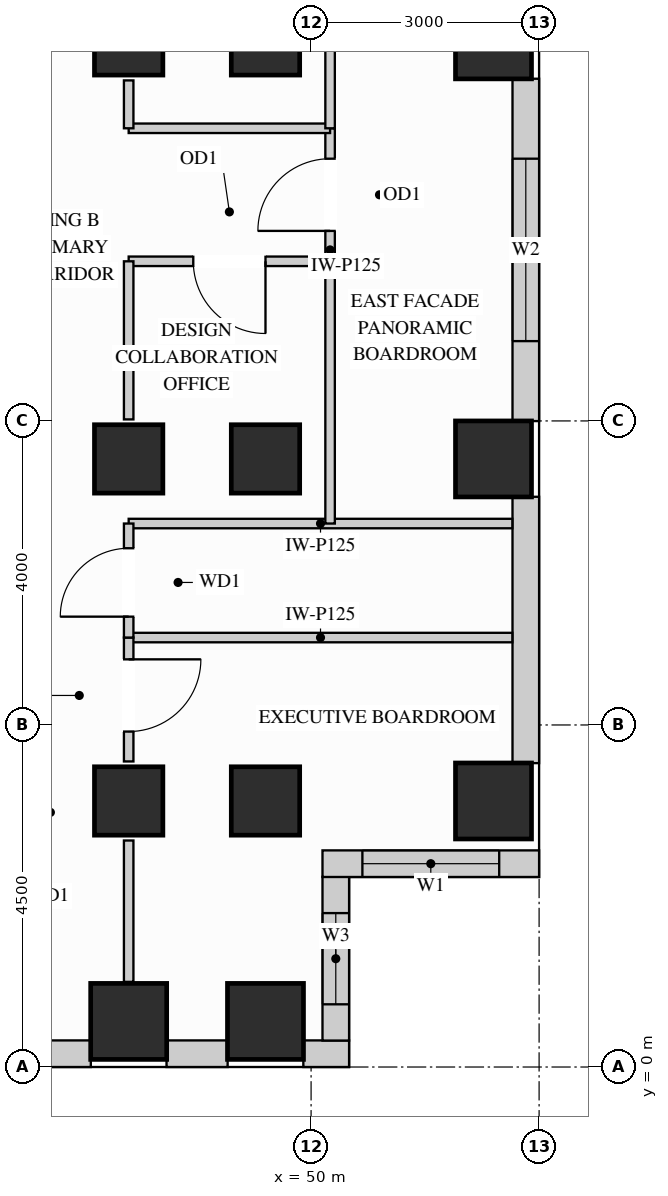
"""IFC4 building model, lengths in metres.
Left out: names, types, materials, properties, quantities, classifications, styles, units other than length and angle.
Written with IfcOpenShell. Run it as: python <this file> out.ifc"""

import sys

from ifc_helpers import new_model, si_unit, direction, frame, frame_2d, origin, origin_2d, place, context, subcontext, project, spatial, rectangle, extrude, source, transform, mapped, element, fill, save


model = new_model("IFC4")
c1 = context("Model", 3, precision=1e-05, world=origin(), true_north=direction((0.0, 1.0)))
c2 = subcontext(c1, "Body", "Model", "MODEL_VIEW")
j1 = project(units=[si_unit("LENGTHUNIT", "METRE"), si_unit("PLANEANGLEUNIT", "RADIAN")], contexts=[c1])
p1 = place(None, origin())
s1 = spatial("IfcSite", under=j1, at=p1, CompositionType="ELEMENT")
p2 = place(p1, origin())
s2 = spatial("IfcBuilding", under=s1, at=p2, CompositionType="ELEMENT")
p3 = place(p2, frame((0.0, 0.0, 197.1)))
s3 = spatial("IfcBuildingStorey", under=s2, at=p3, CompositionType="ELEMENT", Elevation=197.1)
m1 = source(origin(), c2, "Body", "SweptSolid", [
    extrude(rectangle(XDim=0.9, YDim=0.9, at=origin_2d()), origin(), (0.0, 0.0, 1.0), 3.4),
])
for number, where, z_axis, x_axis in (
    (1, (47.6, 13.5, 0.0), (0.0, 0.0, 1.0), (1.0, 0.0, 0.0)),
    (2, (47.6, 3.5, 0.0), (0.0, 0.0, 1.0), (1.0, 0.0, 0.0)),
    (3, (47.6, 8.0, 0.0), (0.0, 0.0, 1.0), (1.0, 0.0, 0.0)),
    (4, (49.4, 13.5, 0.0), (0.0, 0.0, 1.0), (1.0, 0.0, 0.0)),
    (5, (49.4, 3.5, 0.0), (0.0, 0.0, 1.0), (1.0, 0.0, 0.0)),
    (6, (49.4, 8.0, 0.0), (0.0, 0.0, 1.0), (1.0, 0.0, 0.0)),
):
    element("IfcColumn", number, at=place(p3, frame(where, z_axis=z_axis, x_axis=x_axis)), inside=s3, PredefinedType="COLUMN", context=c2, shape_type="MappedRepresentation", body=[
        mapped(m1, transform((0.0, 0.0, 0.0), x_axis=(1.0, 0.0, 0.0), y_axis=(0.0, 1.0, 0.0), z_axis=(0.0, 0.0, 1.0))),
    ])
m2 = source(origin(), c2, "Body", "SweptSolid", [
    extrude(rectangle(XDim=1.0, YDim=1.0, at=origin_2d()), origin(), (0.0, 0.0, 1.0), 3.4),
])
for number, where, z_axis, x_axis in (
    (7, (52.4, 13.5, 0.0), (0.0, 0.0, 1.0), (1.0, 0.0, 0.0)),
    (8, (52.4, 3.5, 0.0), (0.0, 0.0, 1.0), (1.0, 0.0, 0.0)),
    (9, (52.4, 8.0, 0.0), (0.0, 0.0, 1.0), (1.0, 0.0, 0.0)),
    (10, (47.6, 0.6, 0.0), (0.0, 0.0, 1.0), (1.0, 0.0, 0.0)),
    (11, (49.4, 0.6, 0.0), (0.0, 0.0, 1.0), (1.0, 0.0, 0.0)),
):
    element("IfcColumn", number, at=place(p3, frame(where, z_axis=z_axis, x_axis=x_axis)), inside=s3, PredefinedType="COLUMN", context=c2, shape_type="MappedRepresentation", body=[
        mapped(m2, transform((0.0, 0.0, 0.0), x_axis=(1.0, 0.0, 0.0), y_axis=(0.0, 1.0, 0.0), z_axis=(0.0, 0.0, 1.0))),
    ])
p4 = place(p3, frame((40.498, 0.175, 0.0), z_axis=(0.0, 0.0, 1.0), x_axis=(1.0, 0.0, 0.0)))
e12 = element("IfcWall", 12, at=p4, inside=s3, PredefinedType="SOLIDWALL", context=c2, shape_type="SweptSolid", body=[
    extrude(rectangle(XDim=6.604, YDim=0.35, at=frame_2d((3.302, 0.0))), origin(), (0.0, 0.0, 1.0), 2.612),
])
p5 = place(p4, frame((0.737, 0.0, 0.78)))
e13 = element("IfcOpeningElement", 13, at=p5, cuts=e12, PredefinedType="OPENING", context=c2, shape_type="SweptSolid", body=[
    extrude(rectangle(XDim=1.8, YDim=1.652, at=frame_2d((0.9, 0.826))), frame((0.0, 0.185, 0.0), z_axis=(0.0, -1.0, 0.0), x_axis=(1.0, 0.0, 0.0)), (0.0, 0.0, 1.0), 0.37),
])
p6 = place(p4, frame((2.955, 0.0, 0.78)))
e14 = element("IfcOpeningElement", 14, at=p6, cuts=e12, PredefinedType="OPENING", context=c2, shape_type="SweptSolid", body=[
    extrude(rectangle(XDim=1.8, YDim=1.652, at=frame_2d((0.9, 0.826))), frame((0.0, 0.185, 0.0), z_axis=(0.0, -1.0, 0.0), x_axis=(1.0, 0.0, 0.0)), (0.0, 0.0, 1.0), 0.37),
])
m3 = source(origin(), c2, "Body", "SweptSolid", [
    extrude(rectangle(XDim=0.804, YDim=0.35, at=frame_2d((0.402, 0.0))), origin(), (0.0, 0.0, 1.0), 3.385),
])
p7 = place(p3, frame((48.098, 0.175, 0.0), z_axis=(0.0, 0.0, 1.0), x_axis=(1.0, 0.0, 0.0)))
e15 = element("IfcWall", 15, at=p7, inside=s3, PredefinedType="SOLIDWALL", context=c2, shape_type="MappedRepresentation", body=[
    mapped(m3, transform((0.0, 0.0, 0.0), x_axis=(1.0, 0.0, 0.0), y_axis=(0.0, 1.0, 0.0), z_axis=(0.0, 0.0, 1.0))),
])
m4 = source(origin(), c2, "Body", "SweptSolid", [
    extrude(rectangle(XDim=0.602, YDim=0.35, at=frame_2d((0.301, 0.0))), origin(), (0.0, 0.0, 1.0), 3.385),
])
p8 = place(p3, frame((49.898, 0.175, 0.0), z_axis=(0.0, 0.0, 1.0), x_axis=(1.0, 0.0, 0.0)))
e16 = element("IfcWall", 16, at=p8, inside=s3, PredefinedType="SOLIDWALL", context=c2, shape_type="MappedRepresentation", body=[
    mapped(m4, transform((0.0, 0.0, 0.0), x_axis=(1.0, 0.0, 0.0), y_axis=(0.0, 1.0, 0.0), z_axis=(0.0, 0.0, 1.0))),
])
p9 = place(p3, frame((50.325, 0.348, 0.0), z_axis=(0.0, 0.0, 1.0), x_axis=(0.0, 1.0, 0.0)))
e17 = element("IfcWall", 17, at=p9, inside=s3, PredefinedType="SOLIDWALL", context=c2, shape_type="SweptSolid", body=[
    extrude(rectangle(XDim=2.154, YDim=0.35, at=frame_2d((1.077, 0.0))), origin(), (0.0, 0.0, 1.0), 3.385),
])
p10 = place(p9, frame((0.477, 0.0, 0.78)))
e18 = element("IfcOpeningElement", 18, at=p10, cuts=e17, PredefinedType="OPENING", context=c2, shape_type="SweptSolid", body=[
    extrude(rectangle(XDim=1.2, YDim=2.1, at=frame_2d((0.6, 1.05))), frame((0.0, 0.185, 0.0), z_axis=(0.0, -1.0, 0.0), x_axis=(1.0, 0.0, 0.0)), (0.0, 0.0, 1.0), 0.37),
])
p11 = place(p3, frame((50.15, 2.675, 0.0), z_axis=(0.0, 0.0, 1.0), x_axis=(1.0, 0.0, 0.0)))
e19 = element("IfcWall", 19, at=p11, inside=s3, PredefinedType="SOLIDWALL", context=c2, shape_type="SweptSolid", body=[
    extrude(rectangle(XDim=2.85, YDim=0.35, at=frame_2d((1.425, 0.0))), origin(), (0.0, 0.0, 1.0), 3.385),
])
p12 = place(p11, frame((0.525, 0.0, 0.78)))
e20 = element("IfcOpeningElement", 20, at=p12, cuts=e19, PredefinedType="OPENING", context=c2, shape_type="SweptSolid", body=[
    extrude(rectangle(XDim=1.8, YDim=2.1, at=frame_2d((0.9, 1.05))), frame((0.0, 0.185, 0.0), z_axis=(0.0, -1.0, 0.0), x_axis=(1.0, 0.0, 0.0)), (0.0, 0.0, 1.0), 0.37),
])
m5 = source(origin(), c2, "Body", "SweptSolid", [
    extrude(rectangle(XDim=3.504, YDim=0.35, at=frame_2d((1.752, 0.0))), origin(), (0.0, 0.0, 1.0), 2.612),
])
p13 = place(p3, frame((52.825, 3.998, 0.0), z_axis=(0.0, 0.0, 1.0), x_axis=(0.0, 1.0, 0.0)))
e21 = element("IfcWall", 21, at=p13, inside=s3, PredefinedType="SOLIDWALL", context=c2, shape_type="MappedRepresentation", body=[
    mapped(m5, transform((0.0, 0.0, 0.0), x_axis=(1.0, 0.0, 0.0), y_axis=(0.0, 1.0, 0.0), z_axis=(0.0, 0.0, 1.0))),
])
p14 = place(p3, frame((52.825, 8.498, 0.0), z_axis=(0.0, 0.0, 1.0), x_axis=(0.0, 1.0, 0.0)))
e22 = element("IfcWall", 22, at=p14, inside=s3, PredefinedType="SOLIDWALL", context=c2, shape_type="SweptSolid", body=[
    extrude(rectangle(XDim=4.504, YDim=0.35, at=frame_2d((2.252, 0.0))), origin(), (0.0, 0.0, 1.0), 2.612),
])
p15 = place(p14, frame((1.052, 0.0, 0.78)))
e23 = element("IfcOpeningElement", 23, at=p15, cuts=e22, PredefinedType="OPENING", context=c2, shape_type="SweptSolid", body=[
    extrude(rectangle(XDim=2.4, YDim=1.652, at=frame_2d((1.2, 0.826))), frame((0.0, 0.185, 0.0), z_axis=(0.0, -1.0, 0.0), x_axis=(1.0, 0.0, 0.0)), (0.0, 0.0, 1.0), 0.37),
])
p16 = place(p3, frame((50.25, 10.6, 0.0), z_axis=(0.0, 0.0, 1.0), x_axis=(0.0, 1.0, 0.0)))
e24 = element("IfcWall", 24, at=p16, inside=s3, PredefinedType="PARTITIONING", context=c2, shape_type="SweptSolid", body=[
    extrude(rectangle(XDim=1.75, YDim=0.125, at=frame_2d((0.875, 0.0))), origin(), (0.0, 0.0, 1.0), 3.385),
])
p17 = place(p16, frame((0.4, 0.0, 0.0)))
e25 = element("IfcOpeningElement", 25, at=p17, cuts=e24, PredefinedType="OPENING", context=c2, shape_type="SweptSolid", body=[
    extrude(rectangle(XDim=0.95, YDim=2.15, at=frame_2d((0.475, 1.075))), frame((0.0, 0.073, 0.0), z_axis=(0.0, -1.0, 0.0), x_axis=(1.0, 0.0, 0.0)), (0.0, 0.0, 1.0), 0.145),
])
m6 = source(origin(), c2, "Body", "SweptSolid", [
    extrude(rectangle(XDim=5.048, YDim=0.125, at=frame_2d((2.524, 0.0))), origin(), (0.0, 0.0, 1.0), 3.385),
])
for number, where, z_axis, x_axis in (
    (26, (47.6, 5.65, 0.0), (0.0, 0.0, 1.0), (1.0, 0.0, 0.0)),
    (27, (47.6, 7.15, 0.0), (0.0, 0.0, 1.0), (1.0, 0.0, 0.0)),
):
    element("IfcWall", number, at=place(p3, frame(where, z_axis=z_axis, x_axis=x_axis)), inside=s3, PredefinedType="PARTITIONING", context=c2, shape_type="MappedRepresentation", body=[
        mapped(m6, transform((0.0, 0.0, 0.0), x_axis=(1.0, 0.0, 0.0), y_axis=(0.0, 1.0, 0.0), z_axis=(0.0, 0.0, 1.0))),
    ])
m7 = source(origin(), c2, "Body", "SweptSolid", [
    extrude(rectangle(XDim=2.65, YDim=0.125, at=frame_2d((1.325, 0.0))), origin(), (0.0, 0.0, 1.0), 3.385),
])
p18 = place(p3, frame((47.6, 12.35, 0.0), z_axis=(0.0, 0.0, 1.0), x_axis=(1.0, 0.0, 0.0)))
e28 = element("IfcWall", 28, at=p18, inside=s3, PredefinedType="PARTITIONING", context=c2, shape_type="MappedRepresentation", body=[
    mapped(m7, transform((0.0, 0.0, 0.0), x_axis=(1.0, 0.0, 0.0), y_axis=(0.0, 1.0, 0.0), z_axis=(0.0, 0.0, 1.0))),
])
p19 = place(p3, frame((47.6, 10.6, 0.0), z_axis=(0.0, 0.0, 1.0), x_axis=(1.0, 0.0, 0.0)))
e29 = element("IfcWall", 29, at=p19, inside=s3, PredefinedType="PARTITIONING", context=c2, shape_type="SweptSolid", body=[
    extrude(rectangle(XDim=2.65, YDim=0.125, at=frame_2d((1.325, 0.0))), origin(), (0.0, 0.0, 1.0), 2.773),
])
p20 = place(p19, frame((0.85, 0.0, 0.0)))
e30 = element("IfcOpeningElement", 30, at=p20, cuts=e29, PredefinedType="OPENING", context=c2, shape_type="SweptSolid", body=[
    extrude(rectangle(XDim=0.95, YDim=2.15, at=frame_2d((0.475, 1.075))), frame((0.0, 0.073, 0.0), z_axis=(0.0, -1.0, 0.0), x_axis=(1.0, 0.0, 0.0)), (0.0, 0.0, 1.0), 0.145),
])
m8 = source(origin(), c2, "Body", "SweptSolid", [
    extrude(rectangle(XDim=3.45, YDim=0.125, at=frame_2d((1.725, 0.0))), origin(), (0.0, 0.0, 1.0), 3.385),
])
p21 = place(p3, frame((50.25, 7.15, 0.0), z_axis=(0.0, 0.0, 1.0), x_axis=(0.0, 1.0, 0.0)))
e31 = element("IfcWall", 31, at=p21, inside=s3, PredefinedType="PARTITIONING", context=c2, shape_type="MappedRepresentation", body=[
    mapped(m8, transform((0.0, 0.0, 0.0), x_axis=(1.0, 0.0, 0.0), y_axis=(0.0, 1.0, 0.0), z_axis=(0.0, 0.0, 1.0))),
])
m9 = source(origin(), c2, "Body", "SweptSolid", [
    extrude(rectangle(XDim=2.798, YDim=0.125, at=frame_2d((1.399, 0.0))), origin(), (0.0, 0.0, 1.0), 3.385),
])
p22 = place(p3, frame((50.25, 12.35, 0.0), z_axis=(0.0, 0.0, 1.0), x_axis=(0.0, 1.0, 0.0)))
e32 = element("IfcWall", 32, at=p22, inside=s3, PredefinedType="PARTITIONING", context=c2, shape_type="MappedRepresentation", body=[
    mapped(m9, transform((0.0, 0.0, 0.0), x_axis=(1.0, 0.0, 0.0), y_axis=(0.0, 1.0, 0.0), z_axis=(0.0, 0.0, 1.0))),
])
p23 = place(p3, frame((47.6, 4.02, 0.0), z_axis=(0.0, 0.0, 1.0), x_axis=(0.0, 1.0, 0.0)))
e33 = element("IfcWall", 33, at=p23, inside=s3, PredefinedType="PARTITIONING", context=c2, shape_type="SweptSolid", body=[
    extrude(rectangle(XDim=1.63, YDim=0.125, at=frame_2d((0.815, 0.0))), origin(), (0.0, 0.0, 1.0), 2.773),
])
p24 = place(p23, frame((0.393, 0.0, 0.0)))
e34 = element("IfcOpeningElement", 34, at=p24, cuts=e33, PredefinedType="OPENING", context=c2, shape_type="SweptSolid", body=[
    extrude(rectangle(XDim=0.95, YDim=2.15, at=frame_2d((0.475, 1.075))), frame((0.0, 0.073, 0.0), z_axis=(0.0, -1.0, 0.0), x_axis=(1.0, 0.0, 0.0)), (0.0, 0.0, 1.0), 0.145),
])
m10 = source(origin(), c2, "Body", "SweptSolid", [
    extrude(rectangle(XDim=1.86, YDim=0.125, at=frame_2d((0.93, 0.0))), origin(), (0.0, 0.0, 1.0), 2.773),
])
p25 = place(p3, frame((47.6, 1.12, 0.0), z_axis=(0.0, 0.0, 1.0), x_axis=(0.0, 1.0, 0.0)))
e35 = element("IfcWall", 35, at=p25, inside=s3, PredefinedType="PARTITIONING", context=c2, shape_type="MappedRepresentation", body=[
    mapped(m10, transform((0.0, 0.0, 0.0), x_axis=(1.0, 0.0, 0.0), y_axis=(0.0, 1.0, 0.0), z_axis=(0.0, 0.0, 1.0))),
])
m11 = source(origin(), c2, "Body", "SweptSolid", [
    extrude(rectangle(XDim=2.08, YDim=0.125, at=frame_2d((1.04, 0.0))), origin(), (0.0, 0.0, 1.0), 2.773),
])
p26 = place(p3, frame((47.6, 8.52, 0.0), z_axis=(0.0, 0.0, 1.0), x_axis=(0.0, 1.0, 0.0)))
e36 = element("IfcWall", 36, at=p26, inside=s3, PredefinedType="PARTITIONING", context=c2, shape_type="MappedRepresentation", body=[
    mapped(m11, transform((0.0, 0.0, 0.0), x_axis=(1.0, 0.0, 0.0), y_axis=(0.0, 1.0, 0.0), z_axis=(0.0, 0.0, 1.0))),
])
m12 = source(origin(), c2, "Body", "SweptSolid", [
    extrude(rectangle(XDim=0.63, YDim=0.125, at=frame_2d((0.315, 0.0))), origin(), (0.0, 0.0, 1.0), 2.773),
])
p27 = place(p3, frame((47.6, 12.35, 0.0), z_axis=(0.0, 0.0, 1.0), x_axis=(0.0, 1.0, 0.0)))
e37 = element("IfcWall", 37, at=p27, inside=s3, PredefinedType="PARTITIONING", context=c2, shape_type="MappedRepresentation", body=[
    mapped(m12, transform((0.0, 0.0, 0.0), x_axis=(1.0, 0.0, 0.0), y_axis=(0.0, 1.0, 0.0), z_axis=(0.0, 0.0, 1.0))),
])
p28 = place(p3, frame((47.6, 5.65, 0.0), z_axis=(0.0, 0.0, 1.0), x_axis=(0.0, 1.0, 0.0)))
e38 = element("IfcWall", 38, at=p28, inside=s3, PredefinedType="PARTITIONING", context=c2, shape_type="SweptSolid", body=[
    extrude(rectangle(XDim=1.5, YDim=0.125, at=frame_2d((0.75, 0.0))), origin(), (0.0, 0.0, 1.0), 2.773),
])
p29 = place(p28, frame((0.275, 0.0, 0.0)))
e39 = element("IfcOpeningElement", 39, at=p29, cuts=e38, PredefinedType="OPENING", context=c2, shape_type="SweptSolid", body=[
    extrude(rectangle(XDim=0.9, YDim=2.15, at=frame_2d((0.45, 1.075))), frame((0.0, 0.073, 0.0), z_axis=(0.0, -1.0, 0.0), x_axis=(1.0, 0.0, 0.0)), (0.0, 0.0, 1.0), 0.145),
])
m13 = source(origin(), c2, "Body", "SweptSolid", [
    extrude(rectangle(XDim=0.95, YDim=2.15, at=frame_2d((0.475, 1.075))), frame((0.0, 0.025, 0.0), z_axis=(0.0, -1.0, 0.0), x_axis=(1.0, 0.0, 0.0)), (0.0, 0.0, 1.0), 0.05),
])
p30 = place(p24, origin())
e40 = element("IfcDoor", 40, at=p30, inside=s3, OperationType="SINGLE_SWING_RIGHT", PredefinedType="DOOR", context=c2, shape_type="MappedRepresentation", body=[
    mapped(m13, transform((0.0, 0.0, 0.0), x_axis=(1.0, 0.0, 0.0), y_axis=(0.0, 1.0, 0.0), z_axis=(0.0, 0.0, 1.0))),
])
fill(e34, e40)
p31 = place(p20, origin())
e41 = element("IfcDoor", 41, at=p31, inside=s3, OperationType="SINGLE_SWING_RIGHT", PredefinedType="DOOR", context=c2, shape_type="MappedRepresentation", body=[
    mapped(m13, transform((0.0, 0.0, 0.0), x_axis=(1.0, 0.0, 0.0), y_axis=(0.0, 1.0, 0.0), z_axis=(0.0, 0.0, 1.0))),
])
fill(e30, e41)
p32 = place(p17, origin())
e42 = element("IfcDoor", 42, at=p32, inside=s3, OperationType="SINGLE_SWING_LEFT", PredefinedType="DOOR", context=c2, shape_type="MappedRepresentation", body=[
    mapped(m13, transform((0.0, 0.0, 0.0), x_axis=(1.0, 0.0, 0.0), y_axis=(0.0, 1.0, 0.0), z_axis=(0.0, 0.0, 1.0))),
])
fill(e25, e42)
m14 = source(origin(), c2, "Body", "SweptSolid", [
    extrude(rectangle(XDim=0.9, YDim=2.15, at=frame_2d((0.45, 1.075))), frame((0.0, 0.025, 0.0), z_axis=(0.0, -1.0, 0.0), x_axis=(1.0, 0.0, 0.0)), (0.0, 0.0, 1.0), 0.05),
])
p33 = place(p29, origin())
e43 = element("IfcDoor", 43, at=p33, inside=s3, OperationType="SINGLE_SWING_LEFT", PredefinedType="DOOR", context=c2, shape_type="MappedRepresentation", body=[
    mapped(m14, transform((0.0, 0.0, 0.0), x_axis=(1.0, 0.0, 0.0), y_axis=(0.0, 1.0, 0.0), z_axis=(0.0, 0.0, 1.0))),
])
fill(e39, e43)
m15 = source(origin(), c2, "Body", "SweptSolid", [
    extrude(rectangle(XDim=1.8, YDim=2.1, at=frame_2d((0.9, 1.05))), frame((0.0, 0.03, 0.0), z_axis=(0.0, -1.0, 0.0), x_axis=(1.0, 0.0, 0.0)), (0.0, 0.0, 1.0), 0.06),
])
p34 = place(p12, origin())
e44 = element("IfcWindow", 44, at=p34, inside=s3, PartitioningType="SINGLE_PANEL", PredefinedType="WINDOW", context=c2, shape_type="MappedRepresentation", body=[
    mapped(m15, transform((0.0, 0.0, 0.0), x_axis=(1.0, 0.0, 0.0), y_axis=(0.0, 1.0, 0.0), z_axis=(0.0, 0.0, 1.0))),
])
fill(e20, e44)
m16 = source(origin(), c2, "Body", "SweptSolid", [
    extrude(rectangle(XDim=2.4, YDim=1.652, at=frame_2d((1.2, 0.826))), frame((0.0, 0.03, 0.0), z_axis=(0.0, -1.0, 0.0), x_axis=(1.0, 0.0, 0.0)), (0.0, 0.0, 1.0), 0.06),
])
p35 = place(p15, origin())
e45 = element("IfcWindow", 45, at=p35, inside=s3, PartitioningType="SINGLE_PANEL", PredefinedType="WINDOW", context=c2, shape_type="MappedRepresentation", body=[
    mapped(m16, transform((0.0, 0.0, 0.0), x_axis=(1.0, 0.0, 0.0), y_axis=(0.0, 1.0, 0.0), z_axis=(0.0, 0.0, 1.0))),
])
fill(e23, e45)
m17 = source(origin(), c2, "Body", "SweptSolid", [
    extrude(rectangle(XDim=1.2, YDim=2.1, at=frame_2d((0.6, 1.05))), frame((0.0, 0.03, 0.0), z_axis=(0.0, -1.0, 0.0), x_axis=(1.0, 0.0, 0.0)), (0.0, 0.0, 1.0), 0.06),
])
p36 = place(p10, origin())
e46 = element("IfcWindow", 46, at=p36, inside=s3, PartitioningType="SINGLE_PANEL", PredefinedType="WINDOW", context=c2, shape_type="MappedRepresentation", body=[
    mapped(m17, transform((0.0, 0.0, 0.0), x_axis=(1.0, 0.0, 0.0), y_axis=(0.0, 1.0, 0.0), z_axis=(0.0, 0.0, 1.0))),
])
fill(e18, e46)
save(model, sys.argv[1])
